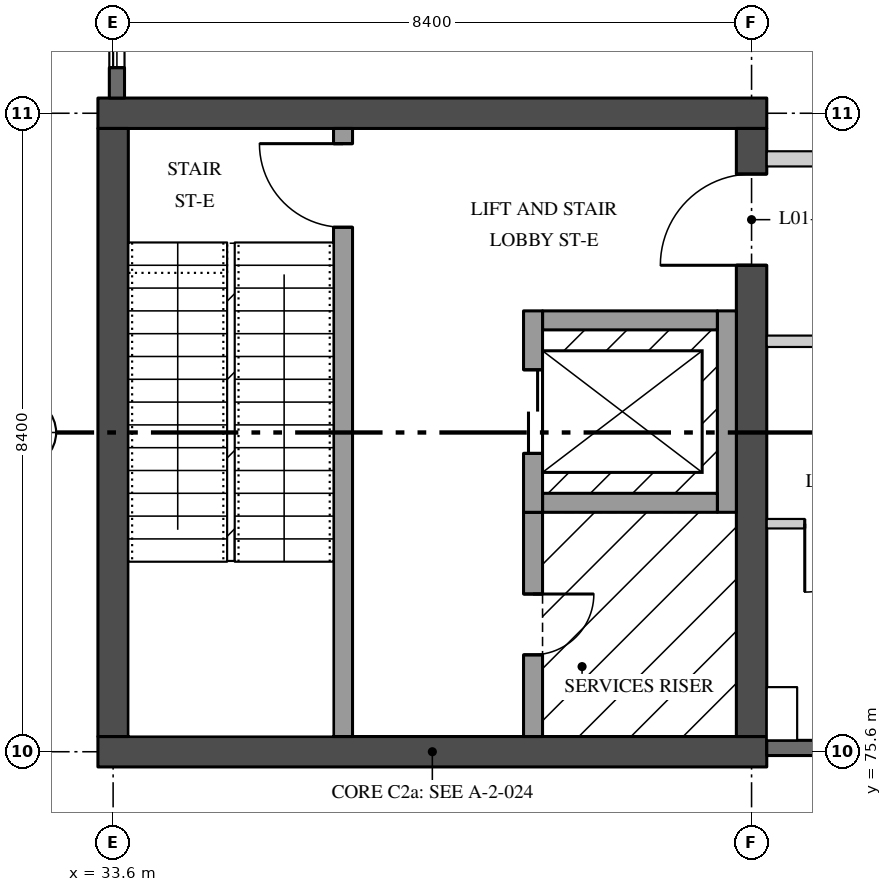
"""IFC4 building model, lengths in metres.
Left out: names, types, materials, properties, quantities, classifications, styles, units other than length and angle.
Written with IfcOpenShell. Run it as: python <this file> out.ifc"""

import sys

from ifc_helpers import new_model, si_unit, direction, frame, frame_2d, origin, place, context, subcontext, project, spatial, rectangle, extrude, element, fill, save


model = new_model("IFC4")
c1 = context("Model", 3, precision=1e-05, world=origin(), true_north=direction((0.0, 1.0)))
c2 = subcontext(c1, "Body", "Model", "MODEL_VIEW")
j1 = project(units=[si_unit("LENGTHUNIT", "METRE"), si_unit("PLANEANGLEUNIT", "RADIAN")], contexts=[c1])
p1 = place(None, origin())
s1 = spatial("IfcSite", under=j1, at=p1, CompositionType="ELEMENT")
p2 = place(p1, origin())
s2 = spatial("IfcBuilding", under=s1, at=p2, CompositionType="ELEMENT")
p3 = place(p2, frame((0.0, 0.0, 5.4)))
s3 = spatial("IfcBuildingStorey", under=s2, at=p3, CompositionType="ELEMENT", Elevation=5.4)
for number, where, z_axis, x_axis in (
    (1, (33.4, 75.6, 0.0), (0.0, 0.0, 1.0), (1.0, 0.0, 0.0)),
    (2, (33.4, 84.0, 0.0), (0.0, 0.0, 1.0), (1.0, 0.0, 0.0)),
):
    element("IfcWall", number, at=place(p3, frame(where, z_axis=z_axis, x_axis=x_axis)), inside=s3, PredefinedType="SHEAR", context=c2, shape_type="SweptSolid", body=[
        extrude(rectangle(XDim=8.8, YDim=0.4, at=frame_2d((4.4, 0.0))), origin(), (0.0, 0.0, 1.0), 4.37),
    ])
p4 = place(p3, frame((33.6, 75.8, 0.0), z_axis=(0.0, 0.0, 1.0), x_axis=(0.0, 1.0, 0.0)))
e3 = element("IfcWall", 3, at=p4, inside=s3, PredefinedType="SHEAR", context=c2, shape_type="SweptSolid", body=[
    extrude(rectangle(XDim=8.0, YDim=0.4, at=frame_2d((4.0, 0.0))), origin(), (0.0, 0.0, 1.0), 4.37),
])
p5 = place(p3, frame((42.0, 75.8, 0.0), z_axis=(0.0, 0.0, 1.0), x_axis=(0.0, 1.0, 0.0)))
e4 = element("IfcWall", 4, at=p5, inside=s3, PredefinedType="SHEAR", context=c2, shape_type="SweptSolid", body=[
    extrude(rectangle(XDim=8.0, YDim=0.4, at=frame_2d((4.0, 0.0))), origin(), (0.0, 0.0, 1.0), 4.37),
])
p6 = place(p5, frame((6.2, 0.0, 0.0)))
e5 = element("IfcOpeningElement", 5, at=p6, cuts=e4, PredefinedType="OPENING", context=c2, shape_type="SweptSolid", body=[
    extrude(rectangle(XDim=1.2, YDim=2.1, at=frame_2d((0.6, 1.05))), frame((0.0, 0.21, 0.0), z_axis=(0.0, -1.0, 0.0), x_axis=(1.0, 0.0, 0.0)), (0.0, 0.0, 1.0), 0.42),
])
p7 = place(p3, frame((36.625, 83.8, 0.0), z_axis=(0.0, 0.0, 1.0), x_axis=(0.0, -1.0, 0.0)))
e6 = element("IfcWall", 6, at=p7, inside=s3, PredefinedType="SOLIDWALL", context=c2, shape_type="SweptSolid", body=[
    extrude(rectangle(XDim=8.0, YDim=0.25, at=frame_2d((4.0, 0.0))), origin(), (0.0, 0.0, 1.0), 4.37),
])
p8 = place(p7, frame((0.2, 0.0, 0.0)))
e7 = element("IfcOpeningElement", 7, at=p8, cuts=e6, PredefinedType="OPENING", context=c2, shape_type="SweptSolid", body=[
    extrude(rectangle(XDim=1.1, YDim=2.1, at=frame_2d((0.55, 1.05))), frame((0.0, 0.135, 0.0), z_axis=(0.0, -1.0, 0.0), x_axis=(1.0, 0.0, 0.0)), (0.0, 0.0, 1.0), 0.27),
])
p9 = place(p3, frame((39.125, 78.75, 0.0), z_axis=(0.0, 0.0, 1.0), x_axis=(0.0, -1.0, 0.0)))
e8 = element("IfcWall", 8, at=p9, inside=s3, PredefinedType="SOLIDWALL", context=c2, shape_type="SweptSolid", body=[
    extrude(rectangle(XDim=2.95, YDim=0.25, at=frame_2d((1.475, 0.0))), origin(), (0.0, 0.0, 1.0), 4.37),
])
p10 = place(p9, frame((1.075, 0.0, 0.0)))
e9 = element("IfcOpeningElement", 9, at=p10, cuts=e8, PredefinedType="OPENING", context=c2, shape_type="SweptSolid", body=[
    extrude(rectangle(XDim=0.8, YDim=2.1, at=frame_2d((0.4, 1.05))), frame((0.0, 0.135, 0.0), z_axis=(0.0, -1.0, 0.0), x_axis=(1.0, 0.0, 0.0)), (0.0, 0.0, 1.0), 0.27),
])
p11 = place(p3, frame((41.675, 78.75, 0.0), z_axis=(0.0, 0.0, 1.0), x_axis=(0.0, 1.0, 0.0)))
e10 = element("IfcWall", 10, at=p11, inside=s3, PredefinedType="SOLIDWALL", context=c2, shape_type="SweptSolid", body=[
    extrude(rectangle(XDim=2.65, YDim=0.25, at=frame_2d((1.325, 0.0))), origin(), (0.0, 0.0, 1.0), 4.37),
])
for number, where, z_axis, x_axis in (
    (11, (39.25, 81.275, 0.0), (0.0, 0.0, 1.0), (1.0, 0.0, 0.0)),
    (12, (39.25, 78.875, 0.0), (0.0, 0.0, 1.0), (1.0, 0.0, 0.0)),
):
    element("IfcWall", number, at=place(p3, frame(where, z_axis=z_axis, x_axis=x_axis)), inside=s3, PredefinedType="SOLIDWALL", context=c2, shape_type="SweptSolid", body=[
        extrude(rectangle(XDim=2.3, YDim=0.25, at=frame_2d((1.15, 0.0))), origin(), (0.0, 0.0, 1.0), 4.37),
    ])
p12 = place(p3, frame((39.125, 78.75, 0.0), z_axis=(0.0, 0.0, 1.0), x_axis=(0.0, 1.0, 0.0)))
e13 = element("IfcWall", 13, at=p12, inside=s3, PredefinedType="SOLIDWALL", context=c2, shape_type="SweptSolid", body=[
    extrude(rectangle(XDim=2.65, YDim=0.25, at=frame_2d((1.325, 0.0))), origin(), (0.0, 0.0, 1.0), 4.37),
])
p13 = place(p12, frame((0.775, 0.0, 0.0)))
e14 = element("IfcOpeningElement", 14, at=p13, cuts=e13, PredefinedType="OPENING", context=c2, shape_type="SweptSolid", body=[
    extrude(rectangle(XDim=1.1, YDim=2.1, at=frame_2d((0.55, 1.05))), frame((0.0, 0.135, 0.0), z_axis=(0.0, -1.0, 0.0), x_axis=(1.0, 0.0, 0.0)), (0.0, 0.0, 1.0), 0.27),
])
p14 = place(p3, frame((42.2, 83.4, 0.0), z_axis=(0.0, 0.0, 1.0), x_axis=(1.0, 0.0, 0.0)))
e15 = element("IfcWall", 15, at=p14, inside=s3, PredefinedType="PARTITIONING", context=c2, shape_type="SweptSolid", body=[
    extrude(rectangle(XDim=2.295, YDim=0.2, at=frame_2d((1.147, 0.0))), origin(), (0.0, 0.0, 1.0), 4.37),
])
p15 = place(p3, frame((42.2, 81.0, 0.0), z_axis=(0.0, 0.0, 1.0), x_axis=(1.0, 0.0, 0.0)))
e16 = element("IfcWall", 16, at=p15, inside=s3, PredefinedType="PARTITIONING", context=c2, shape_type="SweptSolid", body=[
    extrude(rectangle(XDim=2.37, YDim=0.15, at=frame_2d((1.185, 0.0))), origin(), (0.0, 0.0, 1.0), 4.37),
])
p16 = place(p3, frame((42.2, 78.6, 0.0), z_axis=(0.0, 0.0, 1.0), x_axis=(1.0, 0.0, 0.0)))
e17 = element("IfcWall", 17, at=p16, inside=s3, PredefinedType="PARTITIONING", context=c2, shape_type="SweptSolid", body=[
    extrude(rectangle(XDim=2.407, YDim=0.125, at=frame_2d((1.204, 0.0))), origin(), (0.0, 0.0, 1.0), 4.37),
])
p17 = place(p16, frame((0.5, 0.0, 0.0)))
e18 = element("IfcOpeningElement", 18, at=p17, cuts=e17, PredefinedType="OPENING", context=c2, shape_type="SweptSolid", body=[
    extrude(rectangle(XDim=0.9, YDim=2.1, at=frame_2d((0.45, 1.05))), frame((0.0, 0.073, 0.0), z_axis=(0.0, -1.0, 0.0), x_axis=(1.0, 0.0, 0.0)), (0.0, 0.0, 1.0), 0.145),
])
p18 = place(p3, frame((33.65, 92.07, 0.0), z_axis=(0.0, 0.0, 1.0), x_axis=(0.0, -1.0, 0.0)))
e19 = element("IfcWall", 19, at=p18, inside=s3, PredefinedType="SOLIDWALL", context=c2, shape_type="SweptSolid", body=[
    extrude(rectangle(XDim=7.87, YDim=0.2, at=frame_2d((3.935, 0.0))), origin(), (0.0, 0.0, 1.0), 3.746),
])
p19 = place(p18, frame((4.47, 0.0, 0.9)))
e20 = element("IfcOpeningElement", 20, at=p19, cuts=e19, PredefinedType="OPENING", context=c2, shape_type="SweptSolid", body=[
    extrude(rectangle(XDim=3.0, YDim=2.1, at=frame_2d((1.5, 1.05))), frame((0.0, 0.11, 0.0), z_axis=(0.0, -1.0, 0.0), x_axis=(1.0, 0.0, 0.0)), (0.0, 0.0, 1.0), 0.22),
])
p20 = place(p3, frame((42.2, 75.65, 0.0), z_axis=(0.0, 0.0, 1.0), x_axis=(1.0, 0.0, 0.0)))
e21 = element("IfcWall", 21, at=p20, inside=s3, PredefinedType="SOLIDWALL", context=c2, shape_type="SweptSolid", body=[
    extrude(rectangle(XDim=7.87, YDim=0.2, at=frame_2d((3.935, 0.0))), origin(), (0.0, 0.0, 1.0), 3.746),
])
p21 = place(p6, origin())
e22 = element("IfcDoor", 22, at=p21, inside=s3, OperationType="SINGLE_SWING_RIGHT", PredefinedType="DOOR", context=c2, shape_type="SweptSolid", body=[
    extrude(rectangle(XDim=1.2, YDim=2.1, at=frame_2d((0.6, 1.05))), frame((0.0, 0.035, 0.0), z_axis=(0.0, -1.0, 0.0), x_axis=(1.0, 0.0, 0.0)), (0.0, 0.0, 1.0), 0.07),
])
fill(e5, e22)
p22 = place(p10, origin())
e23 = element("IfcDoor", 23, at=p22, inside=s3, OperationType="SINGLE_SWING_RIGHT", PredefinedType="DOOR", context=c2, shape_type="SweptSolid", body=[
    extrude(rectangle(XDim=0.8, YDim=2.1, at=frame_2d((0.4, 1.05))), frame((0.0, 0.035, 0.0), z_axis=(0.0, -1.0, 0.0), x_axis=(1.0, 0.0, 0.0)), (0.0, 0.0, 1.0), 0.07),
])
fill(e9, e23)
p23 = place(p8, frame((1.1, 0.0, 0.0), z_axis=(0.0, 0.0, 1.0), x_axis=(-1.0, 0.0, 0.0)))
e24 = element("IfcDoor", 24, at=p23, inside=s3, OperationType="SINGLE_SWING_LEFT", PredefinedType="DOOR", context=c2, shape_type="SweptSolid", body=[
    extrude(rectangle(XDim=1.1, YDim=2.1, at=frame_2d((0.55, 1.05))), frame((0.0, 0.035, 0.0), z_axis=(0.0, -1.0, 0.0), x_axis=(1.0, 0.0, 0.0)), (0.0, 0.0, 1.0), 0.07),
])
fill(e7, e24)
p24 = place(p13, origin())
e25 = element("IfcDoor", 25, at=p24, inside=s3, OperationType="DOUBLE_DOOR_SLIDING", PredefinedType="DOOR", context=c2, shape_type="SweptSolid", body=[
    extrude(rectangle(XDim=1.1, YDim=2.1, at=frame_2d((0.55, 1.05))), frame((0.0, 0.04, 0.0), z_axis=(0.0, -1.0, 0.0), x_axis=(1.0, 0.0, 0.0)), (0.0, 0.0, 1.0), 0.08),
])
fill(e14, e25)
p25 = place(p17, frame((0.9, 0.0, 0.0), z_axis=(0.0, 0.0, 1.0), x_axis=(-1.0, 0.0, 0.0)))
e26 = element("IfcDoor", 26, at=p25, inside=s3, OperationType="SINGLE_SWING_LEFT", PredefinedType="DOOR", context=c2, shape_type="SweptSolid", body=[
    extrude(rectangle(XDim=0.9, YDim=2.1, at=frame_2d((0.45, 1.05))), frame((0.0, 0.02, 0.0), z_axis=(0.0, -1.0, 0.0), x_axis=(1.0, 0.0, 0.0)), (0.0, 0.0, 1.0), 0.04),
])
fill(e18, e26)
p26 = place(p19, origin())
e27 = element("IfcWindow", 27, at=p26, inside=s3, PartitioningType="SINGLE_PANEL", PredefinedType="WINDOW", context=c2, shape_type="SweptSolid", body=[
    extrude(rectangle(XDim=3.0, YDim=2.1, at=frame_2d((1.5, 1.05))), frame((0.0, 0.04, 0.0), z_axis=(0.0, -1.0, 0.0), x_axis=(1.0, 0.0, 0.0)), (0.0, 0.0, 1.0), 0.08),
])
fill(e20, e27)
save(model, sys.argv[1])
